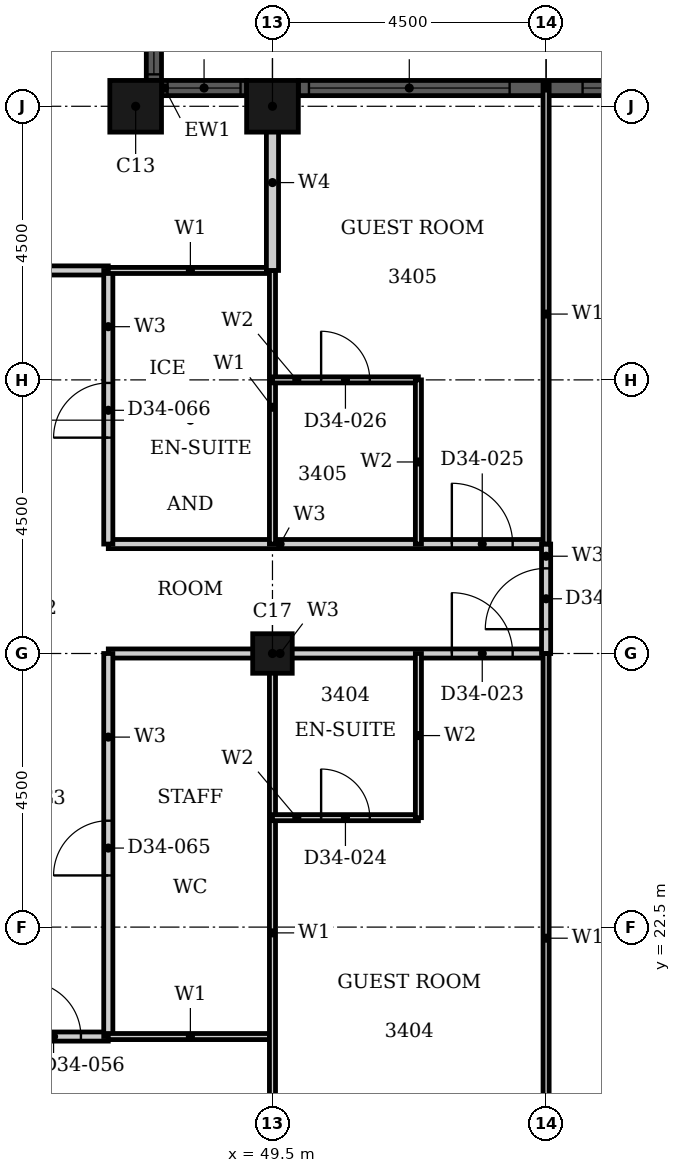
"""IFC4 building model, lengths in metres.
Left out: names, types, materials, properties, quantities, classifications, styles, units other than length and angle.
Written with IfcOpenShell. Run it as: python <this file> out.ifc"""

import sys

from ifc_helpers import new_model, si_unit, direction, frame, frame_2d, origin, origin_2d, place, context, subcontext, project, spatial, rectangle, hollow_rectangle, extrude, element, fill, save


model = new_model("IFC4")
c1 = context("Model", 3, precision=1e-05, world=origin(), true_north=direction((0.0, 1.0)))
c2 = subcontext(c1, "Body", "Model", "MODEL_VIEW")
j1 = project(units=[si_unit("LENGTHUNIT", "METRE"), si_unit("PLANEANGLEUNIT", "RADIAN")], contexts=[c1])
p1 = place(None, origin())
s1 = spatial("IfcSite", under=j1, at=p1, CompositionType="ELEMENT")
p2 = place(p1, origin())
s2 = spatial("IfcBuilding", under=s1, at=p2, CompositionType="ELEMENT")
p3 = place(p2, frame((0.0, 0.0, 136.8)))
s3 = spatial("IfcBuildingStorey", under=s2, at=p3, CompositionType="ELEMENT", Elevation=136.8)
for number, where, z_axis, x_axis in (
    (1, (49.5, 36.0, 0.0), (0.0, 0.0, 1.0), (1.0, 0.0, 0.0)),
    (2, (47.25, 36.0, 0.0), (0.0, 0.0, 1.0), (1.0, 0.0, 0.0)),
):
    element("IfcColumn", number, at=place(p3, frame(where, z_axis=z_axis, x_axis=x_axis)), inside=s3, PredefinedType="COLUMN", context=c2, shape_type="SweptSolid", body=[
        extrude(hollow_rectangle(XDim=0.85, YDim=0.85, WallThickness=0.026, at=origin_2d()), origin(), (0.0, 0.0, 1.0), 3.6),
    ])
p4 = place(p3, frame((49.5, 27.0, 0.0), z_axis=(0.0, 0.0, 1.0), x_axis=(1.0, 0.0, 0.0)))
e3 = element("IfcColumn", 3, at=p4, inside=s3, PredefinedType="COLUMN", context=c2, shape_type="SweptSolid", body=[
    extrude(hollow_rectangle(XDim=0.65, YDim=0.65, WallThickness=0.021, at=origin_2d()), origin(), (0.0, 0.0, 1.0), 3.6),
])
p5 = place(p3, frame((58.075, 36.3, 0.0), z_axis=(0.0, 0.0, 1.0), x_axis=(-1.0, 0.0, 0.0)))
e4 = element("IfcWall", 4, at=p5, inside=s3, PredefinedType="SOLIDWALL", context=c2, shape_type="SweptSolid", body=[
    extrude(rectangle(XDim=8.15, YDim=0.25, at=frame_2d((4.075, 0.0))), origin(), (0.0, 0.0, 1.0), 3.6),
])
p6 = place(p5, frame((0.175, 0.0, 0.9)))
e5 = element("IfcOpeningElement", 5, at=p6, cuts=e4, PredefinedType="OPENING", context=c2, shape_type="SweptSolid", body=[
    extrude(rectangle(XDim=3.3, YDim=1.85, at=frame_2d((1.65, 0.925))), frame((0.0, 0.135, 0.0), z_axis=(0.0, -1.0, 0.0), x_axis=(1.0, 0.0, 0.0)), (0.0, 0.0, 1.0), 0.27),
])
p7 = place(p5, frame((4.675, 0.0, 0.9)))
e6 = element("IfcOpeningElement", 6, at=p7, cuts=e4, PredefinedType="OPENING", context=c2, shape_type="SweptSolid", body=[
    extrude(rectangle(XDim=3.3, YDim=1.85, at=frame_2d((1.65, 0.925))), frame((0.0, 0.135, 0.0), z_axis=(0.0, -1.0, 0.0), x_axis=(1.0, 0.0, 0.0)), (0.0, 0.0, 1.0), 0.27),
])
p8 = place(p3, frame((49.075, 36.3, 0.0), z_axis=(0.0, 0.0, 1.0), x_axis=(-1.0, 0.0, 0.0)))
e7 = element("IfcWall", 7, at=p8, inside=s3, PredefinedType="SOLIDWALL", context=c2, shape_type="SweptSolid", body=[
    extrude(rectangle(XDim=1.4, YDim=0.25, at=frame_2d((0.7, 0.0))), origin(), (0.0, 0.0, 1.0), 3.6),
])
p9 = place(p8, frame((0.1, 0.0, 0.9)))
e8 = element("IfcOpeningElement", 8, at=p9, cuts=e7, PredefinedType="OPENING", context=c2, shape_type="SweptSolid", body=[
    extrude(rectangle(XDim=1.2, YDim=1.85, at=frame_2d((0.6, 0.925))), frame((0.0, 0.135, 0.0), z_axis=(0.0, -1.0, 0.0), x_axis=(1.0, 0.0, 0.0)), (0.0, 0.0, 1.0), 0.27),
])
p10 = place(p3, frame((47.55, 36.425, 0.0), z_axis=(0.0, 0.0, 1.0), x_axis=(0.0, 1.0, 0.0)))
e9 = element("IfcWall", 9, at=p10, inside=s3, PredefinedType="SOLIDWALL", context=c2, shape_type="SweptSolid", body=[
    extrude(rectangle(XDim=1.4, YDim=0.25, at=frame_2d((0.7, 0.0))), origin(), (0.0, 0.0, 1.0), 3.6),
])
p11 = place(p10, frame((0.1, 0.0, 0.9)))
e10 = element("IfcOpeningElement", 10, at=p11, cuts=e9, PredefinedType="OPENING", context=c2, shape_type="SweptSolid", body=[
    extrude(rectangle(XDim=1.2, YDim=1.85, at=frame_2d((0.6, 0.925))), frame((0.0, 0.135, 0.0), z_axis=(0.0, -1.0, 0.0), x_axis=(1.0, 0.0, 0.0)), (0.0, 0.0, 1.0), 0.27),
])
p12 = place(p3, frame((31.5, 20.7, 0.0), z_axis=(0.0, 0.0, 1.0), x_axis=(1.0, 0.0, 0.0)))
e11 = element("IfcWall", 11, at=p12, inside=s3, PredefinedType="PARTITIONING", context=c2, shape_type="SweptSolid", body=[
    extrude(rectangle(XDim=15.3, YDim=0.15, at=frame_2d((7.65, 0.0))), origin(), (0.0, 0.0, 1.0), 3.2),
])
p13 = place(p12, frame((11.95, 0.0, 0.0)))
e12 = element("IfcOpeningElement", 12, at=p13, cuts=e11, PredefinedType="OPENING", context=c2, shape_type="SweptSolid", body=[
    extrude(rectangle(XDim=1.0, YDim=2.1, at=frame_2d((0.5, 1.05))), frame((0.0, 0.085, 0.0), z_axis=(0.0, -1.0, 0.0), x_axis=(1.0, 0.0, 0.0)), (0.0, 0.0, 1.0), 0.17),
])
p14 = place(p12, frame((13.95, 0.0, 0.0)))
e13 = element("IfcOpeningElement", 13, at=p14, cuts=e11, PredefinedType="OPENING", context=c2, shape_type="SweptSolid", body=[
    extrude(rectangle(XDim=0.9, YDim=2.1, at=frame_2d((0.45, 1.05))), frame((0.0, 0.085, 0.0), z_axis=(0.0, -1.0, 0.0), x_axis=(1.0, 0.0, 0.0)), (0.0, 0.0, 1.0), 0.17),
])
p15 = place(p12, frame((1.05, 0.0, 0.0)))
e14 = element("IfcOpeningElement", 14, at=p15, cuts=e11, PredefinedType="OPENING", context=c2, shape_type="SweptSolid", body=[
    extrude(rectangle(XDim=0.9, YDim=2.1, at=frame_2d((0.45, 1.05))), frame((0.0, 0.085, 0.0), z_axis=(0.0, -1.0, 0.0), x_axis=(1.0, 0.0, 0.0)), (0.0, 0.0, 1.0), 0.17),
])
p16 = place(p12, frame((5.55, 0.0, 0.0)))
e15 = element("IfcOpeningElement", 15, at=p16, cuts=e11, PredefinedType="OPENING", context=c2, shape_type="SweptSolid", body=[
    extrude(rectangle(XDim=0.9, YDim=2.1, at=frame_2d((0.45, 1.05))), frame((0.0, 0.085, 0.0), z_axis=(0.0, -1.0, 0.0), x_axis=(1.0, 0.0, 0.0)), (0.0, 0.0, 1.0), 0.17),
])
p17 = place(p3, frame((46.8, 27.0, 0.0), z_axis=(0.0, 0.0, 1.0), x_axis=(1.0, 0.0, 0.0)))
e16 = element("IfcWall", 16, at=p17, inside=s3, PredefinedType="PARTITIONING", context=c2, shape_type="SweptSolid", body=[
    extrude(rectangle(XDim=7.2, YDim=0.15, at=frame_2d((3.6, 0.0))), origin(), (0.0, 0.0, 1.0), 2.48),
])
p18 = place(p17, frame((5.65, 0.0, 0.0)))
e17 = element("IfcOpeningElement", 17, at=p18, cuts=e16, PredefinedType="OPENING", context=c2, shape_type="SweptSolid", body=[
    extrude(rectangle(XDim=1.0, YDim=2.1, at=frame_2d((0.5, 1.05))), frame((0.0, 0.085, 0.0), z_axis=(0.0, -1.0, 0.0), x_axis=(1.0, 0.0, 0.0)), (0.0, 0.0, 1.0), 0.17),
])
p19 = place(p3, frame((46.8, 28.8, 0.0), z_axis=(0.0, 0.0, 1.0), x_axis=(1.0, 0.0, 0.0)))
e18 = element("IfcWall", 18, at=p19, inside=s3, PredefinedType="PARTITIONING", context=c2, shape_type="SweptSolid", body=[
    extrude(rectangle(XDim=7.2, YDim=0.15, at=frame_2d((3.6, 0.0))), origin(), (0.0, 0.0, 1.0), 3.2),
])
p20 = place(p19, frame((5.65, 0.0, 0.0)))
e19 = element("IfcOpeningElement", 19, at=p20, cuts=e18, PredefinedType="OPENING", context=c2, shape_type="SweptSolid", body=[
    extrude(rectangle(XDim=1.0, YDim=2.1, at=frame_2d((0.5, 1.05))), frame((0.0, 0.085, 0.0), z_axis=(0.0, -1.0, 0.0), x_axis=(1.0, 0.0, 0.0)), (0.0, 0.0, 1.0), 0.17),
])
p21 = place(p3, frame((33.3, 33.3, 0.0), z_axis=(0.0, 0.0, 1.0), x_axis=(1.0, 0.0, 0.0)))
e20 = element("IfcWall", 20, at=p21, inside=s3, PredefinedType="PARTITIONING", context=c2, shape_type="SweptSolid", body=[
    extrude(rectangle(XDim=13.5, YDim=0.15, at=frame_2d((6.75, 0.0))), origin(), (0.0, 0.0, 1.0), 3.2),
])
p22 = place(p21, frame((10.15, 0.0, 0.0)))
e21 = element("IfcOpeningElement", 21, at=p22, cuts=e20, PredefinedType="OPENING", context=c2, shape_type="SweptSolid", body=[
    extrude(rectangle(XDim=1.0, YDim=2.1, at=frame_2d((0.5, 1.05))), frame((0.0, 0.085, 0.0), z_axis=(0.0, -1.0, 0.0), x_axis=(1.0, 0.0, 0.0)), (0.0, 0.0, 1.0), 0.17),
])
p23 = place(p21, frame((0.75, 0.0, 0.0)))
e22 = element("IfcOpeningElement", 22, at=p23, cuts=e20, PredefinedType="OPENING", context=c2, shape_type="SweptSolid", body=[
    extrude(rectangle(XDim=0.9, YDim=2.1, at=frame_2d((0.45, 1.05))), frame((0.0, 0.085, 0.0), z_axis=(0.0, -1.0, 0.0), x_axis=(1.0, 0.0, 0.0)), (0.0, 0.0, 1.0), 0.17),
])
p24 = place(p21, frame((4.35, 0.0, 0.0)))
e23 = element("IfcOpeningElement", 23, at=p24, cuts=e20, PredefinedType="OPENING", context=c2, shape_type="SweptSolid", body=[
    extrude(rectangle(XDim=0.9, YDim=2.1, at=frame_2d((0.45, 1.05))), frame((0.0, 0.085, 0.0), z_axis=(0.0, -1.0, 0.0), x_axis=(1.0, 0.0, 0.0)), (0.0, 0.0, 1.0), 0.17),
])
p25 = place(p3, frame((46.8, 28.8, 0.0), z_axis=(0.0, 0.0, 1.0), x_axis=(0.0, 1.0, 0.0)))
e24 = element("IfcWall", 24, at=p25, inside=s3, PredefinedType="PARTITIONING", context=c2, shape_type="SweptSolid", body=[
    extrude(rectangle(XDim=4.5, YDim=0.15, at=frame_2d((2.25, 0.0))), origin(), (0.0, 0.0, 1.0), 3.2),
])
p26 = place(p25, frame((1.75, 0.0, 0.0)))
e25 = element("IfcOpeningElement", 25, at=p26, cuts=e24, PredefinedType="OPENING", context=c2, shape_type="SweptSolid", body=[
    extrude(rectangle(XDim=0.9, YDim=2.1, at=frame_2d((0.45, 1.05))), frame((0.0, 0.085, 0.0), z_axis=(0.0, -1.0, 0.0), x_axis=(1.0, 0.0, 0.0)), (0.0, 0.0, 1.0), 0.17),
])
p27 = place(p3, frame((46.8, 20.7, 0.0), z_axis=(0.0, 0.0, 1.0), x_axis=(0.0, 1.0, 0.0)))
e26 = element("IfcWall", 26, at=p27, inside=s3, PredefinedType="PARTITIONING", context=c2, shape_type="SweptSolid", body=[
    extrude(rectangle(XDim=6.3, YDim=0.15, at=frame_2d((3.15, 0.0))), origin(), (0.0, 0.0, 1.0), 3.2),
])
p28 = place(p27, frame((2.65, 0.0, 0.0)))
e27 = element("IfcOpeningElement", 27, at=p28, cuts=e26, PredefinedType="OPENING", context=c2, shape_type="SweptSolid", body=[
    extrude(rectangle(XDim=0.9, YDim=2.1, at=frame_2d((0.45, 1.05))), frame((0.0, 0.085, 0.0), z_axis=(0.0, -1.0, 0.0), x_axis=(1.0, 0.0, 0.0)), (0.0, 0.0, 1.0), 0.17),
])
p29 = place(p3, frame((54.0, 27.0, 0.0), z_axis=(0.0, 0.0, 1.0), x_axis=(0.0, 1.0, 0.0)))
e28 = element("IfcWall", 28, at=p29, inside=s3, PredefinedType="PARTITIONING", context=c2, shape_type="SweptSolid", body=[
    extrude(rectangle(XDim=1.8, YDim=0.15, at=frame_2d((0.9, 0.0))), origin(), (0.0, 0.0, 1.0), 3.2),
])
p30 = place(p29, frame((0.4, 0.0, 0.0)))
e29 = element("IfcOpeningElement", 29, at=p30, cuts=e28, PredefinedType="OPENING", context=c2, shape_type="SweptSolid", body=[
    extrude(rectangle(XDim=1.0, YDim=2.1, at=frame_2d((0.5, 1.05))), frame((0.0, 0.085, 0.0), z_axis=(0.0, -1.0, 0.0), x_axis=(1.0, 0.0, 0.0)), (0.0, 0.0, 1.0), 0.17),
])
for number, where, z_axis, x_axis in (
    (30, (46.8, 20.7, 0.0), (0.0, 0.0, 1.0), (1.0, 0.0, 0.0)),
    (31, (46.8, 33.3, 0.0), (0.0, 0.0, 1.0), (1.0, 0.0, 0.0)),
):
    element("IfcWall", number, at=place(p3, frame(where, z_axis=z_axis, x_axis=x_axis)), inside=s3, PredefinedType="PARTITIONING", context=c2, shape_type="SweptSolid", body=[
        extrude(rectangle(XDim=2.7, YDim=0.1, at=frame_2d((1.35, 0.0))), origin(), (0.0, 0.0, 1.0), 3.2),
    ])
p31 = place(p3, frame((49.5, 28.8, 0.0), z_axis=(0.0, 0.0, 1.0), x_axis=(0.0, 1.0, 0.0)))
e32 = element("IfcWall", 32, at=p31, inside=s3, PredefinedType="PARTITIONING", context=c2, shape_type="SweptSolid", body=[
    extrude(rectangle(XDim=4.5, YDim=0.1, at=frame_2d((2.25, 0.0))), origin(), (0.0, 0.0, 1.0), 2.28),
])
p32 = place(p3, frame((49.5, 17.81, 0.0), z_axis=(0.0, 0.0, 1.0), x_axis=(0.0, 1.0, 0.0)))
e33 = element("IfcWall", 33, at=p32, inside=s3, PredefinedType="PARTITIONING", context=c2, shape_type="SweptSolid", body=[
    extrude(rectangle(XDim=9.19, YDim=0.1, at=frame_2d((4.595, 0.0))), origin(), (0.0, 0.0, 1.0), 2.28),
])
p33 = place(p3, frame((54.0, 28.8, 0.0), z_axis=(0.0, 0.0, 1.0), x_axis=(0.0, 1.0, 0.0)))
e34 = element("IfcWall", 34, at=p33, inside=s3, PredefinedType="PARTITIONING", context=c2, shape_type="SweptSolid", body=[
    extrude(rectangle(XDim=7.565, YDim=0.1, at=frame_2d((3.782, 0.0))), origin(), (0.0, 0.0, 1.0), 3.2),
])
p34 = place(p3, frame((54.0, 17.635, 0.0), z_axis=(0.0, 0.0, 1.0), x_axis=(0.0, 1.0, 0.0)))
e35 = element("IfcWall", 35, at=p34, inside=s3, PredefinedType="PARTITIONING", context=c2, shape_type="SweptSolid", body=[
    extrude(rectangle(XDim=9.365, YDim=0.1, at=frame_2d((4.683, 0.0))), origin(), (0.0, 0.0, 1.0), 3.2),
])
p35 = place(p3, frame((49.5, 33.3, 0.0), z_axis=(0.0, 0.0, 1.0), x_axis=(0.0, 1.0, 0.0)))
e36 = element("IfcWall", 36, at=p35, inside=s3, PredefinedType="PARTITIONING", context=c2, shape_type="SweptSolid", body=[
    extrude(rectangle(XDim=2.89, YDim=0.2, at=frame_2d((1.445, 0.0))), origin(), (0.0, 0.0, 1.0), 2.28),
])
p36 = place(p3, frame((49.5, 24.3, 0.0), z_axis=(0.0, 0.0, 1.0), x_axis=(1.0, 0.0, 0.0)))
e37 = element("IfcWall", 37, at=p36, inside=s3, PredefinedType="PARTITIONING", context=c2, shape_type="SweptSolid", body=[
    extrude(rectangle(XDim=2.4, YDim=0.1, at=frame_2d((1.2, 0.0))), origin(), (0.0, 0.0, 1.0), 3.2),
])
p37 = place(p36, frame((0.8, 0.0, 0.0)))
e38 = element("IfcOpeningElement", 38, at=p37, cuts=e37, PredefinedType="OPENING", context=c2, shape_type="SweptSolid", body=[
    extrude(rectangle(XDim=0.8, YDim=2.1, at=frame_2d((0.4, 1.05))), frame((0.0, 0.06, 0.0), z_axis=(0.0, -1.0, 0.0), x_axis=(1.0, 0.0, 0.0)), (0.0, 0.0, 1.0), 0.12),
])
p38 = place(p3, frame((49.5, 31.5, 0.0), z_axis=(0.0, 0.0, 1.0), x_axis=(1.0, 0.0, 0.0)))
e39 = element("IfcWall", 39, at=p38, inside=s3, PredefinedType="PARTITIONING", context=c2, shape_type="SweptSolid", body=[
    extrude(rectangle(XDim=2.4, YDim=0.1, at=frame_2d((1.2, 0.0))), origin(), (0.0, 0.0, 1.0), 2.48),
])
p39 = place(p38, frame((0.8, 0.0, 0.0)))
e40 = element("IfcOpeningElement", 40, at=p39, cuts=e39, PredefinedType="OPENING", context=c2, shape_type="SweptSolid", body=[
    extrude(rectangle(XDim=0.8, YDim=2.1, at=frame_2d((0.4, 1.05))), frame((0.0, 0.06, 0.0), z_axis=(0.0, -1.0, 0.0), x_axis=(1.0, 0.0, 0.0)), (0.0, 0.0, 1.0), 0.12),
])
for number, where, z_axis, x_axis in (
    (41, (51.9, 28.8, 0.0), (0.0, 0.0, 1.0), (0.0, 1.0, 0.0)),
    (42, (51.9, 24.3, 0.0), (0.0, 0.0, 1.0), (0.0, 1.0, 0.0)),
):
    element("IfcWall", number, at=place(p3, frame(where, z_axis=z_axis, x_axis=x_axis)), inside=s3, PredefinedType="PARTITIONING", context=c2, shape_type="SweptSolid", body=[
        extrude(rectangle(XDim=2.7, YDim=0.1, at=frame_2d((1.35, 0.0))), origin(), (0.0, 0.0, 1.0), 3.2),
    ])
p40 = place(p6, origin())
e43 = element("IfcWindow", 43, at=p40, inside=s3, PartitioningType="SINGLE_PANEL", PredefinedType="WINDOW", context=c2, shape_type="SweptSolid", body=[
    extrude(rectangle(XDim=3.3, YDim=1.85, at=frame_2d((1.65, 0.925))), frame((0.0, 0.03, 0.0), z_axis=(0.0, -1.0, 0.0), x_axis=(1.0, 0.0, 0.0)), (0.0, 0.0, 1.0), 0.06),
])
fill(e5, e43)
p41 = place(p7, origin())
e44 = element("IfcWindow", 44, at=p41, inside=s3, PartitioningType="SINGLE_PANEL", PredefinedType="WINDOW", context=c2, shape_type="SweptSolid", body=[
    extrude(rectangle(XDim=3.3, YDim=1.85, at=frame_2d((1.65, 0.925))), frame((0.0, 0.03, 0.0), z_axis=(0.0, -1.0, 0.0), x_axis=(1.0, 0.0, 0.0)), (0.0, 0.0, 1.0), 0.06),
])
fill(e6, e44)
p42 = place(p9, origin())
e45 = element("IfcWindow", 45, at=p42, inside=s3, PartitioningType="SINGLE_PANEL", PredefinedType="WINDOW", context=c2, shape_type="SweptSolid", body=[
    extrude(rectangle(XDim=1.2, YDim=1.85, at=frame_2d((0.6, 0.925))), frame((0.0, 0.03, 0.0), z_axis=(0.0, -1.0, 0.0), x_axis=(1.0, 0.0, 0.0)), (0.0, 0.0, 1.0), 0.06),
])
fill(e8, e45)
p43 = place(p11, origin())
e46 = element("IfcWindow", 46, at=p43, inside=s3, PartitioningType="SINGLE_PANEL", PredefinedType="WINDOW", context=c2, shape_type="SweptSolid", body=[
    extrude(rectangle(XDim=1.2, YDim=1.85, at=frame_2d((0.6, 0.925))), frame((0.0, 0.03, 0.0), z_axis=(0.0, -1.0, 0.0), x_axis=(1.0, 0.0, 0.0)), (0.0, 0.0, 1.0), 0.06),
])
fill(e10, e46)
p44 = place(p18, origin())
e47 = element("IfcDoor", 47, at=p44, inside=s3, OperationType="SINGLE_SWING_RIGHT", PredefinedType="DOOR", context=c2, shape_type="SweptSolid", body=[
    extrude(rectangle(XDim=1.0, YDim=2.1, at=frame_2d((0.5, 1.05))), frame((0.0, 0.025, 0.0), z_axis=(0.0, -1.0, 0.0), x_axis=(1.0, 0.0, 0.0)), (0.0, 0.0, 1.0), 0.05),
])
fill(e17, e47)
p45 = place(p37, origin())
e48 = element("IfcDoor", 48, at=p45, inside=s3, OperationType="SINGLE_SWING_RIGHT", PredefinedType="DOOR", context=c2, shape_type="SweptSolid", body=[
    extrude(rectangle(XDim=0.8, YDim=2.1, at=frame_2d((0.4, 1.05))), frame((0.0, 0.025, 0.0), z_axis=(0.0, -1.0, 0.0), x_axis=(1.0, 0.0, 0.0)), (0.0, 0.0, 1.0), 0.05),
])
fill(e38, e48)
p46 = place(p20, origin())
e49 = element("IfcDoor", 49, at=p46, inside=s3, OperationType="SINGLE_SWING_RIGHT", PredefinedType="DOOR", context=c2, shape_type="SweptSolid", body=[
    extrude(rectangle(XDim=1.0, YDim=2.1, at=frame_2d((0.5, 1.05))), frame((0.0, 0.025, 0.0), z_axis=(0.0, -1.0, 0.0), x_axis=(1.0, 0.0, 0.0)), (0.0, 0.0, 1.0), 0.05),
])
fill(e19, e49)
p47 = place(p39, origin())
e50 = element("IfcDoor", 50, at=p47, inside=s3, OperationType="SINGLE_SWING_RIGHT", PredefinedType="DOOR", context=c2, shape_type="SweptSolid", body=[
    extrude(rectangle(XDim=0.8, YDim=2.1, at=frame_2d((0.4, 1.05))), frame((0.0, 0.025, 0.0), z_axis=(0.0, -1.0, 0.0), x_axis=(1.0, 0.0, 0.0)), (0.0, 0.0, 1.0), 0.05),
])
fill(e40, e50)
p48 = place(p30, origin())
e51 = element("IfcDoor", 51, at=p48, inside=s3, OperationType="SINGLE_SWING_LEFT", PredefinedType="DOOR", context=c2, shape_type="SweptSolid", body=[
    extrude(rectangle(XDim=1.0, YDim=2.1, at=frame_2d((0.5, 1.05))), frame((0.0, 0.025, 0.0), z_axis=(0.0, -1.0, 0.0), x_axis=(1.0, 0.0, 0.0)), (0.0, 0.0, 1.0), 0.05),
])
fill(e29, e51)
p49 = place(p14, origin())
e52 = element("IfcDoor", 52, at=p49, inside=s3, OperationType="SINGLE_SWING_LEFT", PredefinedType="DOOR", context=c2, shape_type="SweptSolid", body=[
    extrude(rectangle(XDim=0.9, YDim=2.1, at=frame_2d((0.45, 1.05))), frame((0.0, 0.025, 0.0), z_axis=(0.0, -1.0, 0.0), x_axis=(1.0, 0.0, 0.0)), (0.0, 0.0, 1.0), 0.05),
])
fill(e13, e52)
p50 = place(p28, origin())
e53 = element("IfcDoor", 53, at=p50, inside=s3, OperationType="SINGLE_SWING_RIGHT", PredefinedType="DOOR", context=c2, shape_type="SweptSolid", body=[
    extrude(rectangle(XDim=0.9, YDim=2.1, at=frame_2d((0.45, 1.05))), frame((0.0, 0.025, 0.0), z_axis=(0.0, -1.0, 0.0), x_axis=(1.0, 0.0, 0.0)), (0.0, 0.0, 1.0), 0.05),
])
fill(e27, e53)
p51 = place(p26, origin())
e54 = element("IfcDoor", 54, at=p51, inside=s3, OperationType="SINGLE_SWING_LEFT", PredefinedType="DOOR", context=c2, shape_type="SweptSolid", body=[
    extrude(rectangle(XDim=0.9, YDim=2.1, at=frame_2d((0.45, 1.05))), frame((0.0, 0.025, 0.0), z_axis=(0.0, -1.0, 0.0), x_axis=(1.0, 0.0, 0.0)), (0.0, 0.0, 1.0), 0.05),
])
fill(e25, e54)
save(model, sys.argv[1])
